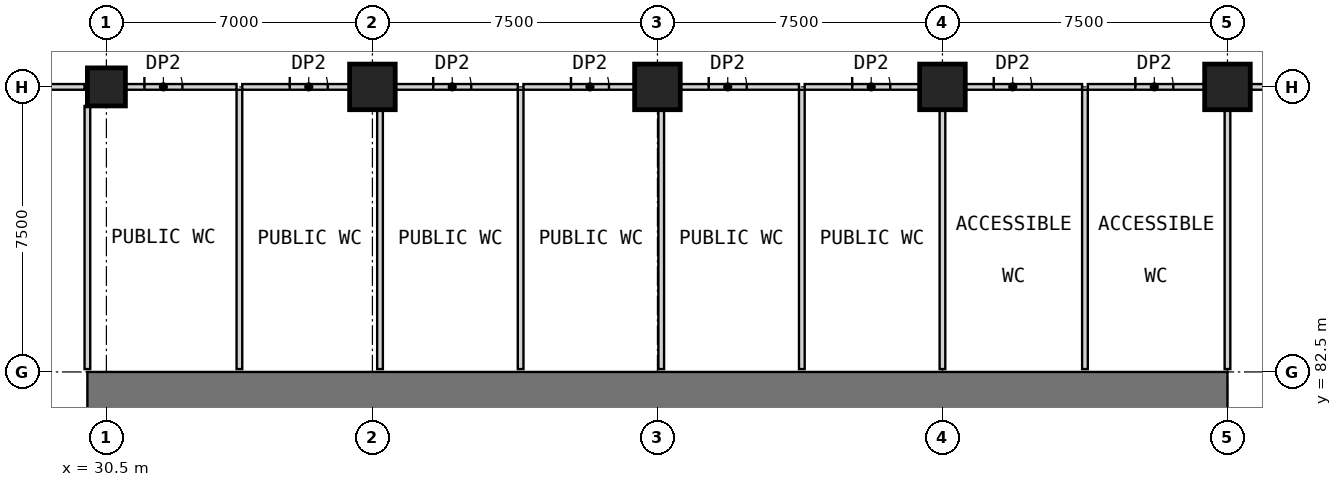
"""IFC4 building model, lengths in metres.
Left out: names, types, materials, properties, quantities, classifications, styles, units other than length and angle.
Written with IfcOpenShell. Run it as: python <this file> out.ifc"""

import sys

from ifc_helpers import new_model, si_unit, direction, frame, frame_2d, origin, origin_2d, place, context, subcontext, project, spatial, rectangle, extrude, element, fill, save


model = new_model("IFC4")
c1 = context("Model", 3, precision=1e-05, world=origin(), true_north=direction((0.0, 1.0)))
c2 = subcontext(c1, "Body", "Model", "MODEL_VIEW")
j1 = project(units=[si_unit("LENGTHUNIT", "METRE"), si_unit("PLANEANGLEUNIT", "RADIAN")], contexts=[c1])
p1 = place(None, origin())
s1 = spatial("IfcSite", under=j1, at=p1, CompositionType="ELEMENT")
p2 = place(p1, origin())
s2 = spatial("IfcBuilding", under=s1, at=p2, CompositionType="ELEMENT")
p3 = place(p2, frame((0.0, 0.0, 13.5)))
s3 = spatial("IfcBuildingStorey", under=s2, at=p3, CompositionType="ELEMENT", Elevation=13.5)
p4 = place(p3, frame((30.5, 90.0, 0.0), z_axis=(0.0, 0.0, 1.0), x_axis=(1.0, 0.0, 0.0)))
e1 = element("IfcColumn", 1, at=p4, inside=s3, PredefinedType="COLUMN", context=c2, shape_type="SweptSolid", body=[
    extrude(rectangle(XDim=1.0, YDim=1.0, at=origin_2d()), origin(), (0.0, 0.0, 1.0), 5.0),
])
for number, where, z_axis, x_axis in (
    (2, (37.5, 90.0, 0.0), (0.0, 0.0, 1.0), (1.0, 0.0, 0.0)),
    (3, (45.0, 90.0, 0.0), (0.0, 0.0, 1.0), (1.0, 0.0, 0.0)),
    (4, (52.5, 90.0, 0.0), (0.0, 0.0, 1.0), (1.0, 0.0, 0.0)),
    (5, (60.0, 90.0, 0.0), (0.0, 0.0, 1.0), (1.0, 0.0, 0.0)),
):
    element("IfcColumn", number, at=place(p3, frame(where, z_axis=z_axis, x_axis=x_axis)), inside=s3, PredefinedType="COLUMN", context=c2, shape_type="SweptSolid", body=[
        extrude(rectangle(XDim=1.2, YDim=1.2, at=origin_2d()), origin(), (0.0, 0.0, 1.0), 5.0),
    ])
p5 = place(p3, frame((30.0, 82.0, 0.0), z_axis=(0.0, 0.0, 1.0), x_axis=(1.0, 0.0, 0.0)))
e6 = element("IfcWall", 6, at=p5, inside=s3, PredefinedType="SHEAR", context=c2, shape_type="SweptSolid", body=[
    extrude(rectangle(XDim=30.0, YDim=1.0, at=frame_2d((15.0, 0.0))), origin(), (0.0, 0.0, 1.0), 5.0),
])
p6 = place(p3, frame((23.6, 90.0, 0.0), z_axis=(0.0, 0.0, 1.0), x_axis=(1.0, 0.0, 0.0)))
e7 = element("IfcWall", 7, at=p6, inside=s3, PredefinedType="PARTITIONING", context=c2, shape_type="SweptSolid", body=[
    extrude(rectangle(XDim=6.325, YDim=0.15, at=frame_2d((3.163, 0.0))), origin(), (0.0, 0.0, 1.0), 4.7),
])
p7 = place(p3, frame((31.0, 90.0, 0.0), z_axis=(0.0, 0.0, 1.0), x_axis=(1.0, 0.0, 0.0)))
e8 = element("IfcWall", 8, at=p7, inside=s3, PredefinedType="PARTITIONING", context=c2, shape_type="SweptSolid", body=[
    extrude(rectangle(XDim=2.925, YDim=0.15, at=frame_2d((1.462, 0.0))), origin(), (0.0, 0.0, 1.0), 4.7),
])
p8 = place(p7, frame((0.5, 0.0, 0.0)))
e9 = element("IfcOpeningElement", 9, at=p8, cuts=e8, PredefinedType="OPENING", context=c2, shape_type="SweptSolid", body=[
    extrude(rectangle(XDim=1.0, YDim=2.1, at=frame_2d((0.5, 1.05))), frame((0.0, 0.085, 0.0), z_axis=(0.0, -1.0, 0.0), x_axis=(1.0, 0.0, 0.0)), (0.0, 0.0, 1.0), 0.17),
])
p9 = place(p3, frame((34.075, 90.0, 0.0), z_axis=(0.0, 0.0, 1.0), x_axis=(1.0, 0.0, 0.0)))
e10 = element("IfcWall", 10, at=p9, inside=s3, PredefinedType="PARTITIONING", context=c2, shape_type="SweptSolid", body=[
    extrude(rectangle(XDim=2.825, YDim=0.15, at=frame_2d((1.413, 0.0))), origin(), (0.0, 0.0, 1.0), 4.7),
])
p10 = place(p9, frame((1.25, 0.0, 0.0)))
e11 = element("IfcOpeningElement", 11, at=p10, cuts=e10, PredefinedType="OPENING", context=c2, shape_type="SweptSolid", body=[
    extrude(rectangle(XDim=1.0, YDim=2.1, at=frame_2d((0.5, 1.05))), frame((0.0, 0.085, 0.0), z_axis=(0.0, -1.0, 0.0), x_axis=(1.0, 0.0, 0.0)), (0.0, 0.0, 1.0), 0.17),
])
p11 = place(p3, frame((38.1, 90.0, 0.0), z_axis=(0.0, 0.0, 1.0), x_axis=(1.0, 0.0, 0.0)))
e12 = element("IfcWall", 12, at=p11, inside=s3, PredefinedType="PARTITIONING", context=c2, shape_type="SweptSolid", body=[
    extrude(rectangle(XDim=3.225, YDim=0.15, at=frame_2d((1.612, 0.0))), origin(), (0.0, 0.0, 1.0), 4.7),
])
p12 = place(p11, frame((1.0, 0.0, 0.0)))
e13 = element("IfcOpeningElement", 13, at=p12, cuts=e12, PredefinedType="OPENING", context=c2, shape_type="SweptSolid", body=[
    extrude(rectangle(XDim=1.0, YDim=2.1, at=frame_2d((0.5, 1.05))), frame((0.0, 0.085, 0.0), z_axis=(0.0, -1.0, 0.0), x_axis=(1.0, 0.0, 0.0)), (0.0, 0.0, 1.0), 0.17),
])
p13 = place(p3, frame((41.475, 90.0, 0.0), z_axis=(0.0, 0.0, 1.0), x_axis=(1.0, 0.0, 0.0)))
e14 = element("IfcWall", 14, at=p13, inside=s3, PredefinedType="PARTITIONING", context=c2, shape_type="SweptSolid", body=[
    extrude(rectangle(XDim=2.925, YDim=0.15, at=frame_2d((1.462, 0.0))), origin(), (0.0, 0.0, 1.0), 4.7),
])
p14 = place(p13, frame((1.25, 0.0, 0.0)))
e15 = element("IfcOpeningElement", 15, at=p14, cuts=e14, PredefinedType="OPENING", context=c2, shape_type="SweptSolid", body=[
    extrude(rectangle(XDim=1.0, YDim=2.1, at=frame_2d((0.5, 1.05))), frame((0.0, 0.085, 0.0), z_axis=(0.0, -1.0, 0.0), x_axis=(1.0, 0.0, 0.0)), (0.0, 0.0, 1.0), 0.17),
])
p15 = place(p3, frame((45.6, 90.0, 0.0), z_axis=(0.0, 0.0, 1.0), x_axis=(1.0, 0.0, 0.0)))
e16 = element("IfcWall", 16, at=p15, inside=s3, PredefinedType="PARTITIONING", context=c2, shape_type="SweptSolid", body=[
    extrude(rectangle(XDim=3.125, YDim=0.15, at=frame_2d((1.562, 0.0))), origin(), (0.0, 0.0, 1.0), 4.7),
])
p16 = place(p15, frame((0.75, 0.0, 0.0)))
e17 = element("IfcOpeningElement", 17, at=p16, cuts=e16, PredefinedType="OPENING", context=c2, shape_type="SweptSolid", body=[
    extrude(rectangle(XDim=1.0, YDim=2.1, at=frame_2d((0.5, 1.05))), frame((0.0, 0.085, 0.0), z_axis=(0.0, -1.0, 0.0), x_axis=(1.0, 0.0, 0.0)), (0.0, 0.0, 1.0), 0.17),
])
p17 = place(p3, frame((48.875, 90.0, 0.0), z_axis=(0.0, 0.0, 1.0), x_axis=(1.0, 0.0, 0.0)))
e18 = element("IfcWall", 18, at=p17, inside=s3, PredefinedType="PARTITIONING", context=c2, shape_type="SweptSolid", body=[
    extrude(rectangle(XDim=3.025, YDim=0.15, at=frame_2d((1.512, 0.0))), origin(), (0.0, 0.0, 1.0), 4.7),
])
p18 = place(p17, frame((1.25, 0.0, 0.0)))
e19 = element("IfcOpeningElement", 19, at=p18, cuts=e18, PredefinedType="OPENING", context=c2, shape_type="SweptSolid", body=[
    extrude(rectangle(XDim=1.0, YDim=2.1, at=frame_2d((0.5, 1.05))), frame((0.0, 0.085, 0.0), z_axis=(0.0, -1.0, 0.0), x_axis=(1.0, 0.0, 0.0)), (0.0, 0.0, 1.0), 0.17),
])
p19 = place(p3, frame((53.1, 90.0, 0.0), z_axis=(0.0, 0.0, 1.0), x_axis=(1.0, 0.0, 0.0)))
e20 = element("IfcWall", 20, at=p19, inside=s3, PredefinedType="PARTITIONING", context=c2, shape_type="SweptSolid", body=[
    extrude(rectangle(XDim=3.075, YDim=0.15, at=frame_2d((1.538, 0.0))), origin(), (0.0, 0.0, 1.0), 4.7),
])
p20 = place(p19, frame((0.75, 0.0, 0.0)))
e21 = element("IfcOpeningElement", 21, at=p20, cuts=e20, PredefinedType="OPENING", context=c2, shape_type="SweptSolid", body=[
    extrude(rectangle(XDim=1.0, YDim=2.1, at=frame_2d((0.5, 1.05))), frame((0.0, 0.085, 0.0), z_axis=(0.0, -1.0, 0.0), x_axis=(1.0, 0.0, 0.0)), (0.0, 0.0, 1.0), 0.17),
])
p21 = place(p3, frame((56.325, 90.0, 0.0), z_axis=(0.0, 0.0, 1.0), x_axis=(1.0, 0.0, 0.0)))
e22 = element("IfcWall", 22, at=p21, inside=s3, PredefinedType="PARTITIONING", context=c2, shape_type="SweptSolid", body=[
    extrude(rectangle(XDim=3.075, YDim=0.15, at=frame_2d((1.538, 0.0))), origin(), (0.0, 0.0, 1.0), 4.7),
])
p22 = place(p21, frame((1.25, 0.0, 0.0)))
e23 = element("IfcOpeningElement", 23, at=p22, cuts=e22, PredefinedType="OPENING", context=c2, shape_type="SweptSolid", body=[
    extrude(rectangle(XDim=1.0, YDim=2.1, at=frame_2d((0.5, 1.05))), frame((0.0, 0.085, 0.0), z_axis=(0.0, -1.0, 0.0), x_axis=(1.0, 0.0, 0.0)), (0.0, 0.0, 1.0), 0.17),
])
p23 = place(p3, frame((60.6, 90.0, 0.0), z_axis=(0.0, 0.0, 1.0), x_axis=(1.0, 0.0, 0.0)))
e24 = element("IfcWall", 24, at=p23, inside=s3, PredefinedType="PARTITIONING", context=c2, shape_type="SweptSolid", body=[
    extrude(rectangle(XDim=6.3, YDim=0.15, at=frame_2d((3.15, 0.0))), origin(), (0.0, 0.0, 1.0), 4.7),
])
p24 = place(p23, frame((3.5, 0.0, 0.0)))
e25 = element("IfcOpeningElement", 25, at=p24, cuts=e24, PredefinedType="OPENING", context=c2, shape_type="SweptSolid", body=[
    extrude(rectangle(XDim=1.8, YDim=2.4, at=frame_2d((0.9, 1.2))), frame((0.0, 0.085, 0.0), z_axis=(0.0, -1.0, 0.0), x_axis=(1.0, 0.0, 0.0)), (0.0, 0.0, 1.0), 0.17),
])
for number, where, z_axis, x_axis in (
    (26, (34.0, 82.575, 0.0), (0.0, 0.0, 1.0), (0.0, 1.0, 0.0)),
    (27, (56.25, 82.575, 0.0), (0.0, 0.0, 1.0), (0.0, 1.0, 0.0)),
):
    element("IfcWall", number, at=place(p3, frame(where, z_axis=z_axis, x_axis=x_axis)), inside=s3, PredefinedType="PARTITIONING", context=c2, shape_type="SweptSolid", body=[
        extrude(rectangle(XDim=7.35, YDim=0.15, at=frame_2d((3.675, 0.0))), origin(), (0.0, 0.0, 1.0), 4.7),
    ])
p25 = place(p3, frame((52.5, 82.575, 0.0), z_axis=(0.0, 0.0, 1.0), x_axis=(0.0, 1.0, 0.0)))
e28 = element("IfcWall", 28, at=p25, inside=s3, PredefinedType="PARTITIONING", context=c2, shape_type="SweptSolid", body=[
    extrude(rectangle(XDim=6.825, YDim=0.15, at=frame_2d((3.413, 0.0))), origin(), (0.0, 0.0, 1.0), 4.7),
])
p26 = place(p3, frame((30.0, 82.575, 0.0), z_axis=(0.0, 0.0, 1.0), x_axis=(0.0, 1.0, 0.0)))
e29 = element("IfcWall", 29, at=p26, inside=s3, PredefinedType="PARTITIONING", context=c2, shape_type="SweptSolid", body=[
    extrude(rectangle(XDim=6.925, YDim=0.15, at=frame_2d((3.462, 0.0))), origin(), (0.0, 0.0, 1.0), 4.7),
])
p27 = place(p3, frame((37.7, 82.575, 0.0), z_axis=(0.0, 0.0, 1.0), x_axis=(0.0, 1.0, 0.0)))
e30 = element("IfcWall", 30, at=p27, inside=s3, PredefinedType="PARTITIONING", context=c2, shape_type="SweptSolid", body=[
    extrude(rectangle(XDim=6.825, YDim=0.15, at=frame_2d((3.413, 0.0))), origin(), (0.0, 0.0, 1.0), 4.7),
])
p28 = place(p3, frame((41.4, 82.575, 0.0), z_axis=(0.0, 0.0, 1.0), x_axis=(0.0, 1.0, 0.0)))
e31 = element("IfcWall", 31, at=p28, inside=s3, PredefinedType="PARTITIONING", context=c2, shape_type="SweptSolid", body=[
    extrude(rectangle(XDim=7.35, YDim=0.15, at=frame_2d((3.675, 0.0))), origin(), (0.0, 0.0, 1.0), 4.7),
])
p29 = place(p3, frame((45.1, 82.575, 0.0), z_axis=(0.0, 0.0, 1.0), x_axis=(0.0, 1.0, 0.0)))
e32 = element("IfcWall", 32, at=p29, inside=s3, PredefinedType="PARTITIONING", context=c2, shape_type="SweptSolid", body=[
    extrude(rectangle(XDim=6.825, YDim=0.15, at=frame_2d((3.413, 0.0))), origin(), (0.0, 0.0, 1.0), 4.7),
])
p30 = place(p3, frame((48.8, 82.575, 0.0), z_axis=(0.0, 0.0, 1.0), x_axis=(0.0, 1.0, 0.0)))
e33 = element("IfcWall", 33, at=p30, inside=s3, PredefinedType="PARTITIONING", context=c2, shape_type="SweptSolid", body=[
    extrude(rectangle(XDim=7.35, YDim=0.15, at=frame_2d((3.675, 0.0))), origin(), (0.0, 0.0, 1.0), 4.7),
])
p31 = place(p3, frame((60.0, 82.575, 0.0), z_axis=(0.0, 0.0, 1.0), x_axis=(0.0, 1.0, 0.0)))
e34 = element("IfcWall", 34, at=p31, inside=s3, PredefinedType="PARTITIONING", context=c2, shape_type="SweptSolid", body=[
    extrude(rectangle(XDim=6.825, YDim=0.15, at=frame_2d((3.413, 0.0))), origin(), (0.0, 0.0, 1.0), 4.7),
])
p32 = place(p8, origin())
e35 = element("IfcDoor", 35, at=p32, inside=s3, OperationType="SINGLE_SWING_LEFT", PredefinedType="DOOR", context=c2, shape_type="SweptSolid", body=[
    extrude(rectangle(XDim=1.0, YDim=2.1, at=frame_2d((0.5, 1.05))), frame((0.0, 0.025, 0.0), z_axis=(0.0, -1.0, 0.0), x_axis=(1.0, 0.0, 0.0)), (0.0, 0.0, 1.0), 0.05),
])
fill(e9, e35)
p33 = place(p10, origin())
e36 = element("IfcDoor", 36, at=p33, inside=s3, OperationType="SINGLE_SWING_LEFT", PredefinedType="DOOR", context=c2, shape_type="SweptSolid", body=[
    extrude(rectangle(XDim=1.0, YDim=2.1, at=frame_2d((0.5, 1.05))), frame((0.0, 0.025, 0.0), z_axis=(0.0, -1.0, 0.0), x_axis=(1.0, 0.0, 0.0)), (0.0, 0.0, 1.0), 0.05),
])
fill(e11, e36)
p34 = place(p12, origin())
e37 = element("IfcDoor", 37, at=p34, inside=s3, OperationType="SINGLE_SWING_LEFT", PredefinedType="DOOR", context=c2, shape_type="SweptSolid", body=[
    extrude(rectangle(XDim=1.0, YDim=2.1, at=frame_2d((0.5, 1.05))), frame((0.0, 0.025, 0.0), z_axis=(0.0, -1.0, 0.0), x_axis=(1.0, 0.0, 0.0)), (0.0, 0.0, 1.0), 0.05),
])
fill(e13, e37)
p35 = place(p14, origin())
e38 = element("IfcDoor", 38, at=p35, inside=s3, OperationType="SINGLE_SWING_LEFT", PredefinedType="DOOR", context=c2, shape_type="SweptSolid", body=[
    extrude(rectangle(XDim=1.0, YDim=2.1, at=frame_2d((0.5, 1.05))), frame((0.0, 0.025, 0.0), z_axis=(0.0, -1.0, 0.0), x_axis=(1.0, 0.0, 0.0)), (0.0, 0.0, 1.0), 0.05),
])
fill(e15, e38)
p36 = place(p16, origin())
e39 = element("IfcDoor", 39, at=p36, inside=s3, OperationType="SINGLE_SWING_LEFT", PredefinedType="DOOR", context=c2, shape_type="SweptSolid", body=[
    extrude(rectangle(XDim=1.0, YDim=2.1, at=frame_2d((0.5, 1.05))), frame((0.0, 0.025, 0.0), z_axis=(0.0, -1.0, 0.0), x_axis=(1.0, 0.0, 0.0)), (0.0, 0.0, 1.0), 0.05),
])
fill(e17, e39)
p37 = place(p18, origin())
e40 = element("IfcDoor", 40, at=p37, inside=s3, OperationType="SINGLE_SWING_LEFT", PredefinedType="DOOR", context=c2, shape_type="SweptSolid", body=[
    extrude(rectangle(XDim=1.0, YDim=2.1, at=frame_2d((0.5, 1.05))), frame((0.0, 0.025, 0.0), z_axis=(0.0, -1.0, 0.0), x_axis=(1.0, 0.0, 0.0)), (0.0, 0.0, 1.0), 0.05),
])
fill(e19, e40)
p38 = place(p20, origin())
e41 = element("IfcDoor", 41, at=p38, inside=s3, OperationType="SINGLE_SWING_LEFT", PredefinedType="DOOR", context=c2, shape_type="SweptSolid", body=[
    extrude(rectangle(XDim=1.0, YDim=2.1, at=frame_2d((0.5, 1.05))), frame((0.0, 0.025, 0.0), z_axis=(0.0, -1.0, 0.0), x_axis=(1.0, 0.0, 0.0)), (0.0, 0.0, 1.0), 0.05),
])
fill(e21, e41)
p39 = place(p22, origin())
e42 = element("IfcDoor", 42, at=p39, inside=s3, OperationType="SINGLE_SWING_LEFT", PredefinedType="DOOR", context=c2, shape_type="SweptSolid", body=[
    extrude(rectangle(XDim=1.0, YDim=2.1, at=frame_2d((0.5, 1.05))), frame((0.0, 0.025, 0.0), z_axis=(0.0, -1.0, 0.0), x_axis=(1.0, 0.0, 0.0)), (0.0, 0.0, 1.0), 0.05),
])
fill(e23, e42)
save(model, sys.argv[1])
